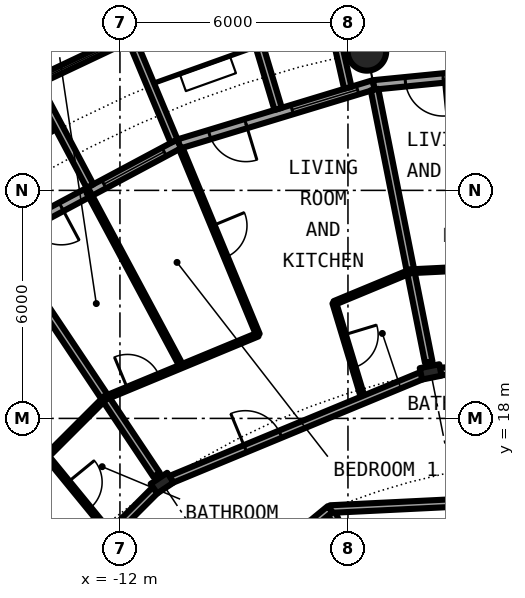
"""IFC4 building model, lengths in metres.
Left out: names, types, materials, properties, quantities, classifications, styles, units other than length and angle.
Written with IfcOpenShell. Run it as: python <this file> out.ifc"""

import sys

from ifc_helpers import new_model, si_unit, direction, frame, frame_2d, origin, origin_2d, place, context, subcontext, project, spatial, rectangle, circle, hollow_circle, i_section, extrude, element, fill, save


model = new_model("IFC4")
c1 = context("Model", 3, precision=1e-05, world=origin(), true_north=direction((0.0, 1.0)))
c2 = subcontext(c1, "Body", "Model", "MODEL_VIEW")
j1 = project(units=[si_unit("LENGTHUNIT", "METRE"), si_unit("PLANEANGLEUNIT", "RADIAN")], contexts=[c1])
p1 = place(None, origin())
s1 = spatial("IfcSite", under=j1, at=p1, CompositionType="ELEMENT")
p2 = place(p1, origin())
s2 = spatial("IfcBuilding", under=s1, at=p2, CompositionType="ELEMENT")
p3 = place(p2, frame((0.0, 0.0, 72.75)))
s3 = spatial("IfcBuildingStorey", under=s2, at=p3, CompositionType="ELEMENT", Elevation=72.75)
p4 = place(p3, frame((-5.501, 27.658, 0.0), z_axis=(0.0, 0.0, 1.0), x_axis=(1.0, 0.0, 0.0)))
e1 = element("IfcColumn", 1, at=p4, inside=s3, PredefinedType="COLUMN", context=c2, shape_type="SweptSolid", body=[
    extrude(hollow_circle(Radius=0.508, WallThickness=0.04, at=origin_2d()), origin(), (0.0, 0.0, 1.0), 3.05),
])
for number, where, z_axis, x_axis in (
    (2, (-3.824, 19.223, 0.0), (0.0, 0.0, 1.0), (-0.195, 0.981, 0.0)),
    (3, (-10.889, 16.297, 0.0), (0.0, 0.0, 1.0), (-0.556, 0.831, 0.0)),
):
    element("IfcColumn", number, at=place(p3, frame(where, z_axis=z_axis, x_axis=x_axis)), inside=s3, PredefinedType="COLUMN", context=c2, shape_type="SweptSolid", body=[
        extrude(i_section(OverallWidth=0.306, OverallDepth=0.524, WebThickness=0.021, FlangeThickness=0.04, FilletRadius=0.027, at=origin_2d()), origin(), (0.0, 0.0, 1.0), 3.05),
    ])
p5 = place(p3, frame((0.0, 27.3, 0.0), z_axis=(0.0, 0.0, 1.0), x_axis=(-0.995173996315, -0.098126026407, 0.0)))
e4 = element("IfcWall", 4, at=p5, inside=s3, PredefinedType="SOLIDWALL", context=c2, shape_type="SweptSolid", body=[
    extrude(rectangle(XDim=5.352, YDim=0.25, at=frame_2d((2.676, 0.0))), origin(), (0.0, 0.0, 1.0), 2.7),
])
p6 = place(p5, frame((0.441, 0.0, 0.3)))
e5 = element("IfcOpeningElement", 5, at=p6, cuts=e4, PredefinedType="OPENING", context=c2, shape_type="SweptSolid", body=[
    extrude(rectangle(XDim=1.8, YDim=2.1, at=frame_2d((0.9, 1.05))), frame((0.0, 0.135, 0.0), z_axis=(0.0, -1.0, 0.0), x_axis=(1.0, 0.0, 0.0)), (0.0, 0.0, 1.0), 0.27),
])
p7 = place(p5, frame((3.51, 0.0, 0.0)))
e6 = element("IfcOpeningElement", 6, at=p7, cuts=e4, PredefinedType="OPENING", context=c2, shape_type="SweptSolid", body=[
    extrude(rectangle(XDim=1.0, YDim=2.2, at=frame_2d((0.5, 1.1))), frame((0.0, 0.135, 0.0), z_axis=(0.0, -1.0, 0.0), x_axis=(1.0, 0.0, 0.0)), (0.0, 0.0, 1.0), 0.27),
])
p8 = place(p3, frame((-5.326, 26.775, 0.0), z_axis=(0.0, 0.0, 1.0), x_axis=(-0.956965678721, -0.290201119486, 0.0)))
e7 = element("IfcWall", 7, at=p8, inside=s3, PredefinedType="SOLIDWALL", context=c2, shape_type="SweptSolid", body=[
    extrude(rectangle(XDim=5.351, YDim=0.25, at=frame_2d((2.676, 0.0))), origin(), (0.0, 0.0, 1.0), 2.7),
])
p9 = place(p8, frame((0.441, 0.0, 0.3)))
e8 = element("IfcOpeningElement", 8, at=p9, cuts=e7, PredefinedType="OPENING", context=c2, shape_type="SweptSolid", body=[
    extrude(rectangle(XDim=1.8, YDim=2.1, at=frame_2d((0.9, 1.05))), frame((0.0, 0.135, 0.0), z_axis=(0.0, -1.0, 0.0), x_axis=(1.0, 0.0, 0.0)), (0.0, 0.0, 1.0), 0.27),
])
p10 = place(p8, frame((3.51, 0.0, 0.0)))
e9 = element("IfcOpeningElement", 9, at=p10, cuts=e7, PredefinedType="OPENING", context=c2, shape_type="SweptSolid", body=[
    extrude(rectangle(XDim=1.0, YDim=2.2, at=frame_2d((0.5, 1.1))), frame((0.0, 0.135, 0.0), z_axis=(0.0, -1.0, 0.0), x_axis=(1.0, 0.0, 0.0)), (0.0, 0.0, 1.0), 0.27),
])
p11 = place(p3, frame((-6.004, 26.7, -0.03), z_axis=(0.0, 0.0, 1.0), x_axis=(-0.219609259383, 0.975587911566, 0.0)))
e10 = element("IfcWall", 10, at=p11, inside=s3, PredefinedType="SOLIDWALL", context=c2, shape_type="SweptSolid", body=[
    extrude(rectangle(XDim=2.933, YDim=0.2, at=frame_2d((1.466, 0.0))), origin(), (0.0, 0.0, 1.0), 2.73),
])
p12 = place(p3, frame((-7.837, 26.144, -0.03), z_axis=(0.0, 0.0, 1.0), x_axis=(-0.287064767992, 0.957911174889, 0.0)))
e11 = element("IfcWall", 11, at=p12, inside=s3, PredefinedType="SOLIDWALL", context=c2, shape_type="SweptSolid", body=[
    extrude(rectangle(XDim=3.006, YDim=0.2, at=frame_2d((1.503, 0.0))), origin(), (0.0, 0.0, 1.0), 2.73),
])
p13 = place(p3, frame((-10.447, 25.222, 0.0), z_axis=(0.0, 0.0, 1.0), x_axis=(-0.881915646801, -0.471407246368, 0.0)))
e12 = element("IfcWall", 12, at=p13, inside=s3, PredefinedType="SOLIDWALL", context=c2, shape_type="SweptSolid", body=[
    extrude(rectangle(XDim=5.352, YDim=0.25, at=frame_2d((2.676, 0.0))), origin(), (0.0, 0.0, 1.0), 2.7),
])
p14 = place(p13, frame((0.441, 0.0, 0.3)))
e13 = element("IfcOpeningElement", 13, at=p14, cuts=e12, PredefinedType="OPENING", context=c2, shape_type="SweptSolid", body=[
    extrude(rectangle(XDim=1.8, YDim=2.1, at=frame_2d((0.9, 1.05))), frame((0.0, 0.135, 0.0), z_axis=(0.0, -1.0, 0.0), x_axis=(1.0, 0.0, 0.0)), (0.0, 0.0, 1.0), 0.27),
])
p15 = place(p13, frame((3.51, 0.0, 0.0)))
e14 = element("IfcOpeningElement", 14, at=p15, cuts=e12, PredefinedType="OPENING", context=c2, shape_type="SweptSolid", body=[
    extrude(rectangle(XDim=1.0, YDim=2.2, at=frame_2d((0.5, 1.1))), frame((0.0, 0.135, 0.0), z_axis=(0.0, -1.0, 0.0), x_axis=(1.0, 0.0, 0.0)), (0.0, 0.0, 1.0), 0.27),
])
p16 = place(p3, frame((-11.629, 28.088, -0.03), z_axis=(0.0, 0.0, 1.0), x_axis=(-0.904000060331, -0.427532327342, 0.0)))
e15 = element("IfcWall", 15, at=p16, inside=s3, PredefinedType="SOLIDWALL", context=c2, shape_type="SweptSolid", body=[
    extrude(rectangle(XDim=2.993, YDim=0.2, at=frame_2d((1.497, 0.0))), origin(), (0.0, 0.0, 1.0), 2.73),
])
p17 = place(p16, frame((0.457, 0.0, 0.33)))
e16 = element("IfcOpeningElement", 16, at=p17, cuts=e15, PredefinedType="OPENING", context=c2, shape_type="SweptSolid", body=[
    extrude(circle(Radius=1.04, at=frame_2d((1.04, 1.04))), frame((0.0, 0.11, 0.0), z_axis=(0.0, -1.0, 0.0), x_axis=(1.0, 0.0, 0.0)), (0.0, 0.0, 1.0), 0.22),
])
p18 = place(p3, frame((-10.575, 25.295, -0.03), z_axis=(0.0, 0.0, 1.0), x_axis=(-0.385697364644, 0.922625353492, 0.0)))
e17 = element("IfcWall", 17, at=p18, inside=s3, PredefinedType="SOLIDWALL", context=c2, shape_type="SweptSolid", body=[
    extrude(rectangle(XDim=2.883, YDim=0.2, at=frame_2d((1.442, 0.0))), origin(), (0.0, 0.0, 1.0), 2.73),
])
p19 = place(p3, frame((-12.787, 24.113, -0.03), z_axis=(0.0, 0.0, 1.0), x_axis=(-0.468365282436, 0.883534924159, 0.0)))
e18 = element("IfcWall", 18, at=p19, inside=s3, PredefinedType="SOLIDWALL", context=c2, shape_type="SweptSolid", body=[
    extrude(rectangle(XDim=3.006, YDim=0.2, at=frame_2d((1.503, 0.0))), origin(), (0.0, 0.0, 1.0), 2.73),
])
p20 = place(p3, frame((-15.097, 22.595, 0.0), z_axis=(0.0, 0.0, 1.0), x_axis=(0.555516661303, -0.831505405283, 0.0)))
e19 = element("IfcWall", 19, at=p20, inside=s3, PredefinedType="PARTITIONING", context=c2, shape_type="SweptSolid", body=[
    extrude(rectangle(XDim=7.312, YDim=0.2, at=frame_2d((3.656, 0.0))), origin(), (0.0, 0.0, 1.0), 2.7),
])
p21 = place(p3, frame((-13.927, 17.004, 0.0), z_axis=(0.0, 0.0, 1.0), x_axis=(0.633582447834, -0.77367517848, 0.0)))
e20 = element("IfcWall", 20, at=p21, inside=s3, PredefinedType="PARTITIONING", context=c2, shape_type="SweptSolid", body=[
    extrude(rectangle(XDim=2.661, YDim=0.1, at=frame_2d((1.331, 0.0))), origin(), (0.0, 0.0, 1.0), 2.7),
])
p22 = place(p21, frame((0.881, 0.0, 0.0)))
e21 = element("IfcOpeningElement", 21, at=p22, cuts=e20, PredefinedType="OPENING", context=c2, shape_type="SweptSolid", body=[
    extrude(rectangle(XDim=0.9, YDim=2.3, at=frame_2d((0.45, 1.15))), frame((0.0, 0.06, 0.0), z_axis=(0.0, -1.0, 0.0), x_axis=(1.0, 0.0, 0.0)), (0.0, 0.0, 1.0), 0.12),
])
p23 = place(p3, frame((-12.833, 23.954, 0.0), z_axis=(0.0, 0.0, 1.0), x_axis=(0.472148388886, -0.881519085938, 0.0)))
e22 = element("IfcWall", 22, at=p23, inside=s3, PredefinedType="PARTITIONING", context=c2, shape_type="SweptSolid", body=[
    extrude(rectangle(XDim=5.196, YDim=0.1, at=frame_2d((2.598, 0.0))), origin(), (0.0, 0.0, 1.0), 2.7),
])
p24 = place(p3, frame((-10.399, 25.106, 0.0), z_axis=(0.0, 0.0, 1.0), x_axis=(0.382620183578, -0.92390572848, 0.0)))
e23 = element("IfcWall", 23, at=p24, inside=s3, PredefinedType="PARTITIONING", context=c2, shape_type="SweptSolid", body=[
    extrude(rectangle(XDim=5.302, YDim=0.1, at=frame_2d((2.651, 0.0))), origin(), (0.0, 0.0, 1.0), 2.7),
])
p25 = place(p24, frame((2.201, 0.0, 0.0)))
e24 = element("IfcOpeningElement", 24, at=p25, cuts=e23, PredefinedType="OPENING", context=c2, shape_type="SweptSolid", body=[
    extrude(rectangle(XDim=0.9, YDim=2.3, at=frame_2d((0.45, 1.15))), frame((0.0, 0.06, 0.0), z_axis=(0.0, -1.0, 0.0), x_axis=(1.0, 0.0, 0.0)), (0.0, 0.0, 1.0), 0.12),
])
p26 = place(p3, frame((-6.468, 15.614, 0.0), z_axis=(0.0, 0.0, 1.0), x_axis=(0.382646942224, -0.923894646378, 0.0)))
e25 = element("IfcWall", 25, at=p26, inside=s3, PredefinedType="PARTITIONING", context=c2, shape_type="SweptSolid", body=[
    extrude(rectangle(XDim=9.181, YDim=0.2, at=frame_2d((4.59, 0.0))), origin(), (0.0, 0.0, 1.0), 2.7),
])
p27 = place(p3, frame((-6.36, 21.039, 0.0), z_axis=(0.0, 0.0, 1.0), x_axis=(0.289375816213, -0.957215564537, 0.0)))
e26 = element("IfcWall", 26, at=p27, inside=s3, PredefinedType="PARTITIONING", context=c2, shape_type="SweptSolid", body=[
    extrude(rectangle(XDim=2.661, YDim=0.1, at=frame_2d((1.331, 0.0))), origin(), (0.0, 0.0, 1.0), 2.7),
])
p28 = place(p27, frame((0.88, 0.0, 0.0)))
e27 = element("IfcOpeningElement", 27, at=p28, cuts=e26, PredefinedType="OPENING", context=c2, shape_type="SweptSolid", body=[
    extrude(rectangle(XDim=0.9, YDim=2.3, at=frame_2d((0.45, 1.15))), frame((0.0, 0.06, 0.0), z_axis=(0.0, -1.0, 0.0), x_axis=(1.0, 0.0, 0.0)), (0.0, 0.0, 1.0), 0.12),
])
p29 = place(p3, frame((-5.302, 26.653, 0.0), z_axis=(0.0, 0.0, 1.0), x_axis=(0.195114589291, -0.98078045303, 0.0)))
e28 = element("IfcWall", 28, at=p29, inside=s3, PredefinedType="PARTITIONING", context=c2, shape_type="SweptSolid", body=[
    extrude(rectangle(XDim=7.314, YDim=0.2, at=frame_2d((3.657, 0.0))), origin(), (0.0, 0.0, 1.0), 2.7),
])
p30 = place(p3, frame((-6.468, 15.614, 0.0), z_axis=(0.0, 0.0, 1.0), x_axis=(0.998797695979, 0.049022061427, 0.0)))
e29 = element("IfcWall", 29, at=p30, inside=s3, PredefinedType="PARTITIONING", context=c2, shape_type="SweptSolid", body=[
    extrude(rectangle(XDim=11.385, YDim=0.2, at=frame_2d((5.692, 0.0))), origin(), (0.0, 0.0, 1.0), 2.7),
])
p31 = place(p30, frame((6.008, 0.0, 0.0)))
e30 = element("IfcOpeningElement", 30, at=p31, cuts=e29, PredefinedType="OPENING", context=c2, shape_type="SweptSolid", body=[
    extrude(rectangle(XDim=1.0, YDim=2.3, at=frame_2d((0.5, 1.15))), frame((0.0, 0.11, 0.0), z_axis=(0.0, -1.0, 0.0), x_axis=(1.0, 0.0, 0.0)), (0.0, 0.0, 1.0), 0.22),
])
p32 = place(p3, frame((-14.052, 9.389, 0.0), z_axis=(0.0, 0.0, 1.0), x_axis=(0.77292501819, 0.634497372931, 0.0)))
e31 = element("IfcWall", 31, at=p32, inside=s3, PredefinedType="PARTITIONING", context=c2, shape_type="SweptSolid", body=[
    extrude(rectangle(XDim=9.81, YDim=0.2, at=frame_2d((4.905, 0.0))), origin(), (0.0, 0.0, 1.0), 2.7),
])
p33 = place(p32, frame((4.406, 0.0, 0.0)))
e32 = element("IfcOpeningElement", 32, at=p33, cuts=e31, PredefinedType="OPENING", context=c2, shape_type="SweptSolid", body=[
    extrude(rectangle(XDim=1.0, YDim=2.3, at=frame_2d((0.5, 1.15))), frame((0.0, 0.11, 0.0), z_axis=(0.0, -1.0, 0.0), x_axis=(1.0, 0.0, 0.0)), (0.0, 0.0, 1.0), 0.22),
])
p34 = place(p3, frame((-16.186, 11.0, 0.0), z_axis=(0.0, 0.0, 1.0), x_axis=(0.707106781187, 0.707106781187, 0.0)))
e33 = element("IfcWall", 33, at=p34, inside=s3, PredefinedType="PARTITIONING", context=c2, shape_type="SweptSolid", body=[
    extrude(rectangle(XDim=7.334, YDim=0.2, at=frame_2d((3.667, 0.0))), origin(), (0.0, 0.0, 1.0), 2.38),
])
p35 = place(p34, frame((2.211, 0.0, 0.0)))
e34 = element("IfcOpeningElement", 34, at=p35, cuts=e33, PredefinedType="OPENING", context=c2, shape_type="SweptSolid", body=[
    extrude(rectangle(XDim=1.0, YDim=2.3, at=frame_2d((0.5, 1.15))), frame((0.0, 0.11, 0.0), z_axis=(0.0, -1.0, 0.0), x_axis=(1.0, 0.0, 0.0)), (0.0, 0.0, 1.0), 0.22),
])
p36 = place(p3, frame((-10.745, 16.357, 0.0), z_axis=(0.0, 0.0, 1.0), x_axis=(0.923928411035, 0.382565407848, 0.0)))
e35 = element("IfcWall", 35, at=p36, inside=s3, PredefinedType="PARTITIONING", context=c2, shape_type="SweptSolid", body=[
    extrude(rectangle(XDim=7.335, YDim=0.2, at=frame_2d((3.667, 0.0))), origin(), (0.0, 0.0, 1.0), 2.38),
])
p37 = place(p36, frame((2.212, 0.0, 0.0)))
e36 = element("IfcOpeningElement", 36, at=p37, cuts=e35, PredefinedType="OPENING", context=c2, shape_type="SweptSolid", body=[
    extrude(rectangle(XDim=1.0, YDim=2.3, at=frame_2d((0.5, 1.15))), frame((0.0, 0.11, 0.0), z_axis=(0.0, -1.0, 0.0), x_axis=(1.0, 0.0, 0.0)), (0.0, 0.0, 1.0), 0.22),
])
p38 = place(p3, frame((-3.669, 19.231, 0.0), z_axis=(0.0, 0.0, 1.0), x_axis=(0.998803644396, 0.048900715146, 0.0)))
e37 = element("IfcWall", 37, at=p38, inside=s3, PredefinedType="PARTITIONING", context=c2, shape_type="SweptSolid", body=[
    extrude(rectangle(XDim=5.602, YDim=0.2, at=frame_2d((2.801, 0.0))), origin(), (0.0, 0.0, 1.0), 2.38),
])
p39 = place(p38, frame((3.179, 0.0, 0.0)))
e38 = element("IfcOpeningElement", 38, at=p39, cuts=e37, PredefinedType="OPENING", context=c2, shape_type="SweptSolid", body=[
    extrude(rectangle(XDim=1.0, YDim=2.3, at=frame_2d((0.5, 1.15))), frame((0.0, 0.11, 0.0), z_axis=(0.0, -1.0, 0.0), x_axis=(1.0, 0.0, 0.0)), (0.0, 0.0, 1.0), 0.22),
])
p40 = place(p3, frame((-13.924, 17.006, 0.0), z_axis=(0.0, 0.0, 1.0), x_axis=(0.707387256653, 0.706826194425, 0.0)))
e39 = element("IfcWall", 39, at=p40, inside=s3, PredefinedType="PARTITIONING", context=c2, shape_type="SweptSolid", body=[
    extrude(rectangle(XDim=2.176, YDim=0.1, at=frame_2d((1.088, 0.0))), origin(), (0.0, 0.0, 1.0), 2.7),
])
p41 = place(p3, frame((-12.397, 18.536, 0.0), z_axis=(0.0, 0.0, 1.0), x_axis=(0.923761942059, 0.382967197554, 0.0)))
e40 = element("IfcWall", 40, at=p41, inside=s3, PredefinedType="PARTITIONING", context=c2, shape_type="SweptSolid", body=[
    extrude(rectangle(XDim=4.356, YDim=0.1, at=frame_2d((2.178, 0.0))), origin(), (0.0, 0.0, 1.0), 2.7),
])
p42 = place(p41, frame((0.646, 0.0, 0.0)))
e41 = element("IfcOpeningElement", 41, at=p42, cuts=e40, PredefinedType="OPENING", context=c2, shape_type="SweptSolid", body=[
    extrude(rectangle(XDim=0.9, YDim=2.3, at=frame_2d((0.45, 1.15))), frame((0.0, 0.06, 0.0), z_axis=(0.0, -1.0, 0.0), x_axis=(1.0, 0.0, 0.0)), (0.0, 0.0, 1.0), 0.12),
])
p43 = place(p3, frame((-6.36, 21.039, 0.0), z_axis=(0.0, 0.0, 1.0), x_axis=(0.923743082263, 0.383012686436, 0.0)))
e42 = element("IfcWall", 42, at=p43, inside=s3, PredefinedType="PARTITIONING", context=c2, shape_type="SweptSolid", body=[
    extrude(rectangle(XDim=2.175, YDim=0.1, at=frame_2d((1.087, 0.0))), origin(), (0.0, 0.0, 1.0), 2.7),
])
p44 = place(p3, frame((-4.351, 21.872, 0.0), z_axis=(0.0, 0.0, 1.0), x_axis=(0.998797962079, 0.049016639484, 0.0)))
e43 = element("IfcWall", 43, at=p44, inside=s3, PredefinedType="PARTITIONING", context=c2, shape_type="SweptSolid", body=[
    extrude(rectangle(XDim=2.182, YDim=0.1, at=frame_2d((1.091, 0.0))), origin(), (0.0, 0.0, 1.0), 2.7),
])
p45 = place(p7, origin())
e44 = element("IfcDoor", 44, at=p45, inside=s3, OperationType="SINGLE_SWING_LEFT", PredefinedType="DOOR", context=c2, shape_type="SweptSolid", body=[
    extrude(rectangle(XDim=1.0, YDim=2.2, at=frame_2d((0.5, 1.1))), frame((0.0, 0.025, 0.0), z_axis=(0.0, -1.0, 0.0), x_axis=(1.0, 0.0, 0.0)), (0.0, 0.0, 1.0), 0.05),
])
fill(e6, e44)
p46 = place(p9, origin())
e45 = element("IfcWindow", 45, at=p46, inside=s3, PartitioningType="SINGLE_PANEL", PredefinedType="WINDOW", context=c2, shape_type="SweptSolid", body=[
    extrude(rectangle(XDim=1.8, YDim=2.1, at=frame_2d((0.9, 1.05))), frame((0.0, 0.03, 0.0), z_axis=(0.0, -1.0, 0.0), x_axis=(1.0, 0.0, 0.0)), (0.0, 0.0, 1.0), 0.06),
])
fill(e8, e45)
p47 = place(p10, origin())
e46 = element("IfcDoor", 46, at=p47, inside=s3, OperationType="SINGLE_SWING_LEFT", PredefinedType="DOOR", context=c2, shape_type="SweptSolid", body=[
    extrude(rectangle(XDim=1.0, YDim=2.2, at=frame_2d((0.5, 1.1))), frame((0.0, 0.025, 0.0), z_axis=(0.0, -1.0, 0.0), x_axis=(1.0, 0.0, 0.0)), (0.0, 0.0, 1.0), 0.05),
])
fill(e9, e46)
p48 = place(p14, origin())
e47 = element("IfcWindow", 47, at=p48, inside=s3, PartitioningType="SINGLE_PANEL", PredefinedType="WINDOW", context=c2, shape_type="SweptSolid", body=[
    extrude(rectangle(XDim=1.8, YDim=2.1, at=frame_2d((0.9, 1.05))), frame((0.0, 0.03, 0.0), z_axis=(0.0, -1.0, 0.0), x_axis=(1.0, 0.0, 0.0)), (0.0, 0.0, 1.0), 0.06),
])
fill(e13, e47)
p49 = place(p17, origin())
e48 = element("IfcWindow", 48, at=p49, inside=s3, PartitioningType="SINGLE_PANEL", PredefinedType="WINDOW", context=c2, shape_type="SweptSolid", body=[
    extrude(circle(Radius=1.04, at=frame_2d((1.04, 1.04))), frame((0.0, 0.03, 0.0), z_axis=(0.0, -1.0, 0.0), x_axis=(1.0, 0.0, 0.0)), (0.0, 0.0, 1.0), 0.06),
])
fill(e16, e48)
p50 = place(p15, origin())
e49 = element("IfcDoor", 49, at=p50, inside=s3, OperationType="SINGLE_SWING_LEFT", PredefinedType="DOOR", context=c2, shape_type="SweptSolid", body=[
    extrude(rectangle(XDim=1.0, YDim=2.2, at=frame_2d((0.5, 1.1))), frame((0.0, 0.025, 0.0), z_axis=(0.0, -1.0, 0.0), x_axis=(1.0, 0.0, 0.0)), (0.0, 0.0, 1.0), 0.05),
])
fill(e14, e49)
p51 = place(p37, origin())
e50 = element("IfcDoor", 50, at=p51, inside=s3, OperationType="SINGLE_SWING_LEFT", PredefinedType="DOOR", context=c2, shape_type="SweptSolid", body=[
    extrude(rectangle(XDim=1.0, YDim=2.3, at=frame_2d((0.5, 1.15))), frame((0.0, 0.025, 0.0), z_axis=(0.0, -1.0, 0.0), x_axis=(1.0, 0.0, 0.0)), (0.0, 0.0, 1.0), 0.05),
])
fill(e36, e50)
p52 = place(p28, origin())
e51 = element("IfcDoor", 51, at=p52, inside=s3, OperationType="SINGLE_SWING_LEFT", PredefinedType="DOOR", context=c2, shape_type="SweptSolid", body=[
    extrude(rectangle(XDim=0.9, YDim=2.3, at=frame_2d((0.45, 1.15))), frame((0.0, 0.025, 0.0), z_axis=(0.0, -1.0, 0.0), x_axis=(1.0, 0.0, 0.0)), (0.0, 0.0, 1.0), 0.05),
])
fill(e27, e51)
p53 = place(p25, origin())
e52 = element("IfcDoor", 52, at=p53, inside=s3, OperationType="SINGLE_SWING_LEFT", PredefinedType="DOOR", context=c2, shape_type="SweptSolid", body=[
    extrude(rectangle(XDim=0.9, YDim=2.3, at=frame_2d((0.45, 1.15))), frame((0.0, 0.025, 0.0), z_axis=(0.0, -1.0, 0.0), x_axis=(1.0, 0.0, 0.0)), (0.0, 0.0, 1.0), 0.05),
])
fill(e24, e52)
p54 = place(p42, origin())
e53 = element("IfcDoor", 53, at=p54, inside=s3, OperationType="SINGLE_SWING_LEFT", PredefinedType="DOOR", context=c2, shape_type="SweptSolid", body=[
    extrude(rectangle(XDim=0.9, YDim=2.3, at=frame_2d((0.45, 1.15))), frame((0.0, 0.025, 0.0), z_axis=(0.0, -1.0, 0.0), x_axis=(1.0, 0.0, 0.0)), (0.0, 0.0, 1.0), 0.05),
])
fill(e41, e53)
p55 = place(p22, origin())
e54 = element("IfcDoor", 54, at=p55, inside=s3, OperationType="SINGLE_SWING_RIGHT", PredefinedType="DOOR", context=c2, shape_type="SweptSolid", body=[
    extrude(rectangle(XDim=0.9, YDim=2.3, at=frame_2d((0.45, 1.15))), frame((0.0, 0.025, 0.0), z_axis=(0.0, -1.0, 0.0), x_axis=(1.0, 0.0, 0.0)), (0.0, 0.0, 1.0), 0.05),
])
fill(e21, e54)
save(model, sys.argv[1])
